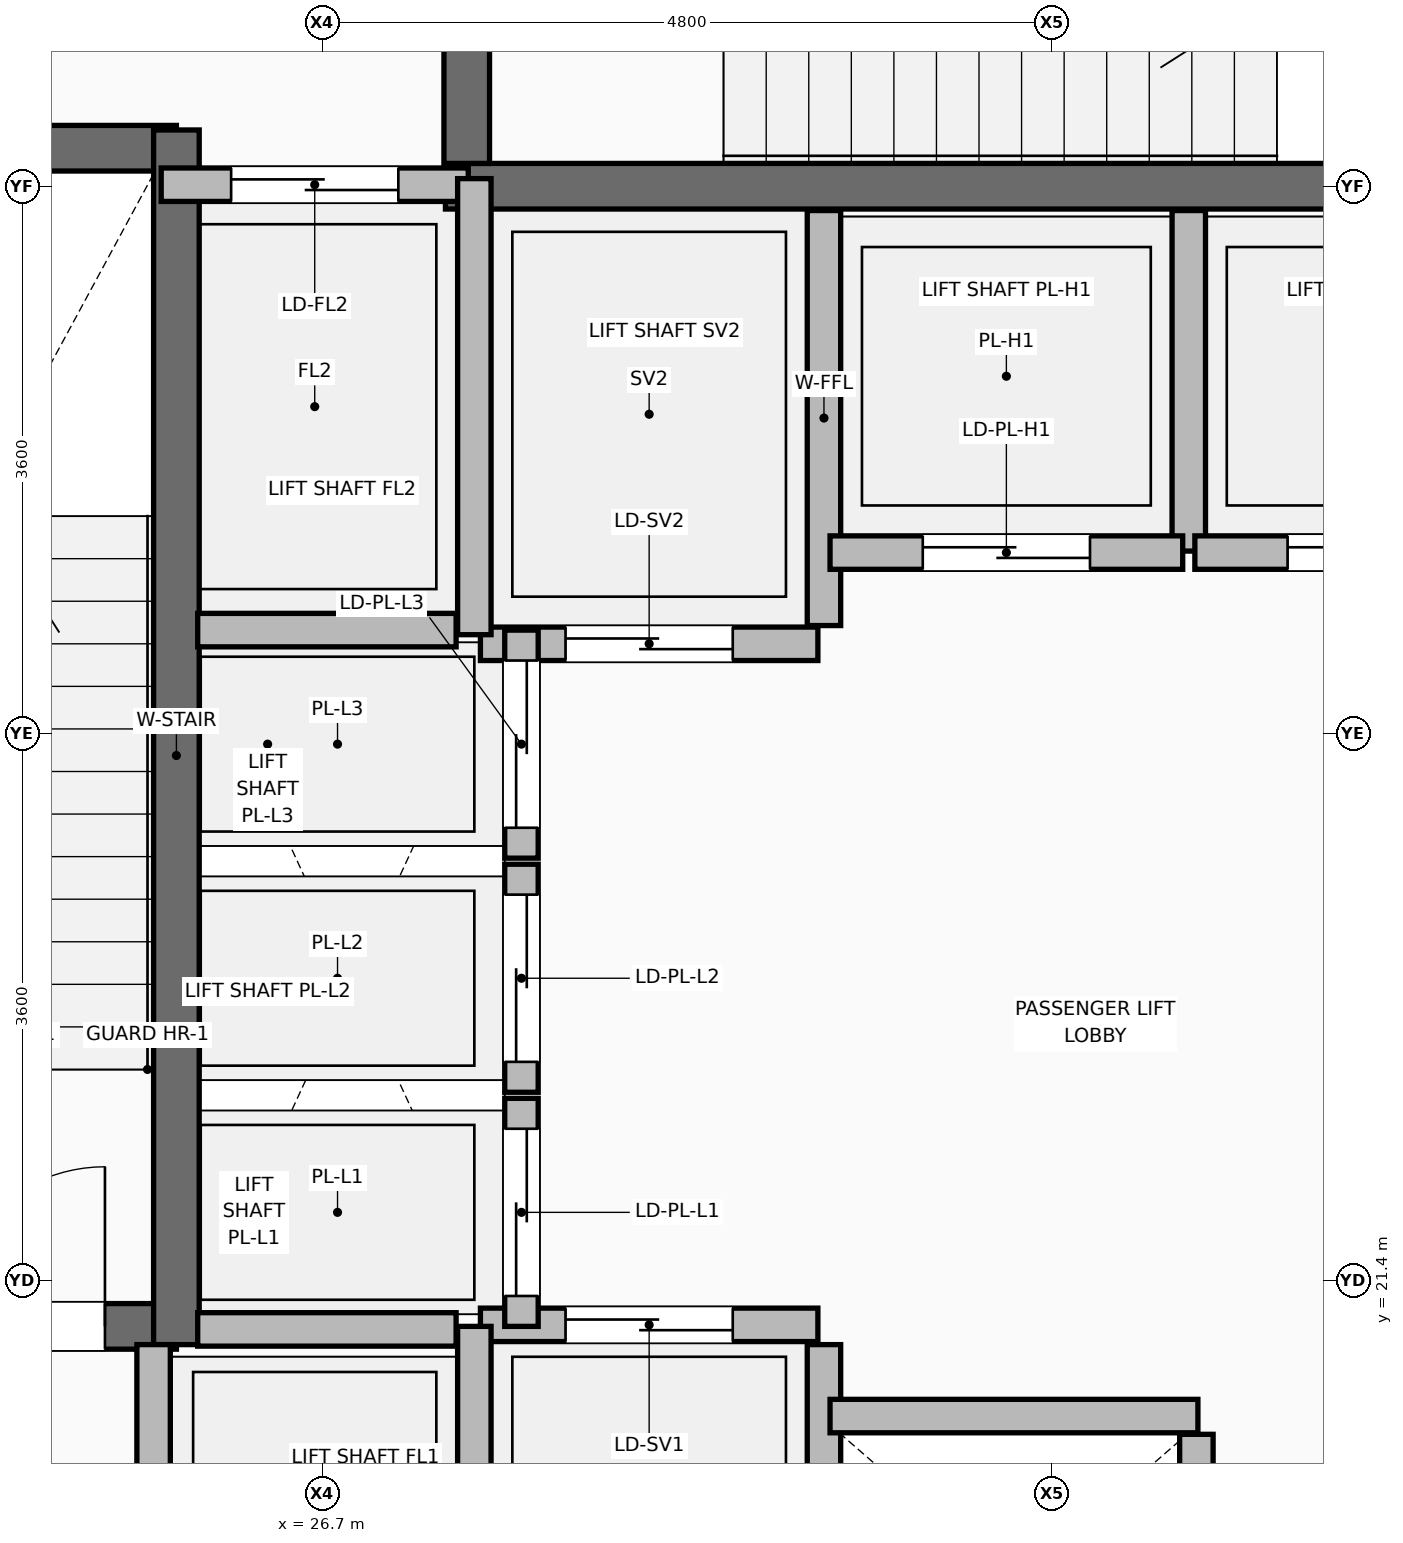
"""IFC4 building model, lengths in metres.
Left out: names, types, materials, properties, quantities, classifications, styles, units other than length and angle.
Written with IfcOpenShell. Run it as: python <this file> out.ifc"""

import sys

from ifc_helpers import new_model, si_unit, direction, frame, frame_2d, origin, place, context, subcontext, project, spatial, rectangle, extrude, element, fill, save


model = new_model("IFC4")
c1 = context("Model", 3, precision=1e-05, world=origin(), true_north=direction((0.0, 1.0)))
c2 = subcontext(c1, "Body", "Model", "MODEL_VIEW")
j1 = project(units=[si_unit("LENGTHUNIT", "METRE"), si_unit("PLANEANGLEUNIT", "RADIAN")], contexts=[c1])
p1 = place(None, origin())
s1 = spatial("IfcSite", under=j1, at=p1, CompositionType="ELEMENT")
p2 = place(p1, origin())
s2 = spatial("IfcBuilding", under=s1, at=p2, CompositionType="ELEMENT")
p3 = place(p2, frame((0.0, 0.0, 96.15)))
s3 = spatial("IfcBuildingStorey", under=s2, at=p3, CompositionType="ELEMENT", Elevation=96.15)
p4 = place(p3, frame((30.0, 18.08, 0.0), z_axis=(0.0, 0.0, 1.0), x_axis=(0.0, 1.0, 0.0)))
e1 = element("IfcWall", 1, at=p4, inside=s3, PredefinedType="PARTITIONING", context=c2, shape_type="SweptSolid", body=[
    extrude(rectangle(XDim=2.9, YDim=0.22, at=frame_2d((1.45, 0.0))), origin(), (0.0, 0.0, 1.0), 4.595),
])
p5 = place(p3, frame((32.45, 17.92, 0.0), z_axis=(0.0, 0.0, 1.0), x_axis=(0.0, 1.0, 0.0)))
e2 = element("IfcWall", 2, at=p5, inside=s3, PredefinedType="PARTITIONING", context=c2, shape_type="SweptSolid", body=[
    extrude(rectangle(XDim=2.47, YDim=0.22, at=frame_2d((1.235, 0.0))), origin(), (0.0, 0.0, 1.0), 4.056),
])
p6 = place(p3, frame((30.0, 25.71, 0.0), z_axis=(0.0, 0.0, 1.0), x_axis=(0.0, 1.0, 0.0)))
e3 = element("IfcWall", 3, at=p6, inside=s3, PredefinedType="PARTITIONING", context=c2, shape_type="SweptSolid", body=[
    extrude(rectangle(XDim=2.73, YDim=0.22, at=frame_2d((1.365, 0.0))), origin(), (0.0, 0.0, 1.0), 4.595),
])
p7 = place(p3, frame((32.4, 26.2, 0.0), z_axis=(0.0, 0.0, 1.0), x_axis=(0.0, 1.0, 0.0)))
e4 = element("IfcWall", 4, at=p7, inside=s3, PredefinedType="PARTITIONING", context=c2, shape_type="SweptSolid", body=[
    extrude(rectangle(XDim=2.24, YDim=0.22, at=frame_2d((1.12, 0.0))), origin(), (0.0, 0.0, 1.0), 4.595),
])
p8 = place(p3, frame((22.175, 21.1, 0.0), z_axis=(0.0, 0.0, 1.0), x_axis=(1.0, 0.0, 0.0)))
e5 = element("IfcWall", 5, at=p8, inside=s3, PredefinedType="SHEAR", context=c2, shape_type="SweptSolid", body=[
    extrude(rectangle(XDim=3.565, YDim=0.3, at=frame_2d((1.782, 0.0))), origin(), (0.0, 0.0, 1.0), 4.62),
])
p9 = place(p8, frame((2.045, 0.0, 0.0)))
e6 = element("IfcOpeningElement", 6, at=p9, cuts=e5, PredefinedType="OPENING", context=c2, shape_type="SweptSolid", body=[
    extrude(rectangle(XDim=1.05, YDim=2.1, at=frame_2d((0.525, 1.05))), frame((0.0, 0.16, 0.0), z_axis=(0.0, -1.0, 0.0), x_axis=(1.0, 0.0, 0.0)), (0.0, 0.0, 1.0), 0.32),
])
p10 = place(p3, frame((22.175, 28.85, 0.0), z_axis=(0.0, 0.0, 1.0), x_axis=(1.0, 0.0, 0.0)))
e7 = element("IfcWall", 7, at=p10, inside=s3, PredefinedType="SHEAR", context=c2, shape_type="SweptSolid", body=[
    extrude(rectangle(XDim=3.565, YDim=0.3, at=frame_2d((1.782, 0.0))), origin(), (0.0, 0.0, 1.0), 4.62),
])
p11 = place(p3, frame((25.74, 20.98, 0.0), z_axis=(0.0, 0.0, 1.0), x_axis=(0.0, 1.0, 0.0)))
e8 = element("IfcWall", 8, at=p11, inside=s3, PredefinedType="SHEAR", context=c2, shape_type="SweptSolid", body=[
    extrude(rectangle(XDim=7.99, YDim=0.3, at=frame_2d((3.995, 0.0))), origin(), (0.0, 0.0, 1.0), 4.62),
])
p12 = place(p3, frame((27.51, 28.6, 0.0), z_axis=(0.0, 0.0, 1.0), x_axis=(1.0, 0.0, 0.0)))
e9 = element("IfcWall", 9, at=p12, inside=s3, PredefinedType="SHEAR", context=c2, shape_type="SweptSolid", body=[
    extrude(rectangle(XDim=8.03, YDim=0.3, at=frame_2d((4.015, 0.0))), origin(), (0.0, 0.0, 1.0), 4.62),
])
p13 = place(p3, frame((27.65, 28.75, 0.0), z_axis=(0.0, 0.0, 1.0), x_axis=(0.0, 1.0, 0.0)))
e10 = element("IfcWall", 10, at=p13, inside=s3, PredefinedType="SHEAR", context=c2, shape_type="SweptSolid", body=[
    extrude(rectangle(XDim=3.425, YDim=0.3, at=frame_2d((1.712, 0.0))), origin(), (0.0, 0.0, 1.0), 4.62),
])
p14 = place(p13, frame((1.0, 0.0, 0.0)))
e11 = element("IfcOpeningElement", 11, at=p14, cuts=e10, PredefinedType="OPENING", context=c2, shape_type="SweptSolid", body=[
    extrude(rectangle(XDim=1.05, YDim=2.1, at=frame_2d((0.525, 1.05))), frame((0.0, 0.16, 0.0), z_axis=(0.0, -1.0, 0.0), x_axis=(1.0, 0.0, 0.0)), (0.0, 0.0, 1.0), 0.32),
])
p15 = place(p3, frame((25.59, 18.22, 0.0), z_axis=(0.0, 0.0, 1.0), x_axis=(0.0, 1.0, 0.0)))
e12 = element("IfcWall", 12, at=p15, inside=s3, PredefinedType="PARTITIONING", context=c2, shape_type="SweptSolid", body=[
    extrude(rectangle(XDim=2.76, YDim=0.22, at=frame_2d((1.38, 0.0))), origin(), (0.0, 0.0, 1.0), 4.6),
])
p16 = place(p15, frame((0.83, 0.0, 0.0)))
e13 = element("IfcOpeningElement", 13, at=p16, cuts=e12, PredefinedType="OPENING", context=c2, shape_type="SweptSolid", body=[
    extrude(rectangle(XDim=1.1, YDim=2.2, at=frame_2d((0.55, 1.1))), frame((0.0, 0.12, 0.0), z_axis=(0.0, -1.0, 0.0), x_axis=(1.0, 0.0, 0.0)), (0.0, 0.0, 1.0), 0.24),
])
p17 = place(p3, frame((25.64, 28.61, 0.0), z_axis=(0.0, 0.0, 1.0), x_axis=(1.0, 0.0, 0.0)))
e14 = element("IfcWall", 14, at=p17, inside=s3, PredefinedType="PARTITIONING", context=c2, shape_type="SweptSolid", body=[
    extrude(rectangle(XDim=2.02, YDim=0.22, at=frame_2d((1.01, 0.0))), origin(), (0.0, 0.0, 1.0), 4.6),
])
p18 = place(p17, frame((0.46, 0.0, 0.0)))
e15 = element("IfcOpeningElement", 15, at=p18, cuts=e14, PredefinedType="OPENING", context=c2, shape_type="SweptSolid", body=[
    extrude(rectangle(XDim=1.1, YDim=2.2, at=frame_2d((0.55, 1.1))), frame((0.0, 0.12, 0.0), z_axis=(0.0, -1.0, 0.0), x_axis=(1.0, 0.0, 0.0)), (0.0, 0.0, 1.0), 0.24),
])
p19 = place(p3, frame((27.74, 21.11, 0.0), z_axis=(0.0, 0.0, 1.0), x_axis=(1.0, 0.0, 0.0)))
e16 = element("IfcWall", 16, at=p19, inside=s3, PredefinedType="PARTITIONING", context=c2, shape_type="SweptSolid", body=[
    extrude(rectangle(XDim=2.22, YDim=0.22, at=frame_2d((1.11, 0.0))), origin(), (0.0, 0.0, 1.0), 4.6),
])
p20 = place(p19, frame((0.56, 0.0, 0.0)))
e17 = element("IfcOpeningElement", 17, at=p20, cuts=e16, PredefinedType="OPENING", context=c2, shape_type="SweptSolid", body=[
    extrude(rectangle(XDim=1.1, YDim=2.2, at=frame_2d((0.55, 1.1))), frame((0.0, 0.12, 0.0), z_axis=(0.0, -1.0, 0.0), x_axis=(1.0, 0.0, 0.0)), (0.0, 0.0, 1.0), 0.24),
])
p21 = place(p3, frame((27.74, 25.59, 0.0), z_axis=(0.0, 0.0, 1.0), x_axis=(1.0, 0.0, 0.0)))
e18 = element("IfcWall", 18, at=p21, inside=s3, PredefinedType="PARTITIONING", context=c2, shape_type="SweptSolid", body=[
    extrude(rectangle(XDim=2.22, YDim=0.22, at=frame_2d((1.11, 0.0))), origin(), (0.0, 0.0, 1.0), 4.6),
])
p22 = place(p21, frame((0.56, 0.0, 0.0)))
e19 = element("IfcOpeningElement", 19, at=p22, cuts=e18, PredefinedType="OPENING", context=c2, shape_type="SweptSolid", body=[
    extrude(rectangle(XDim=1.1, YDim=2.2, at=frame_2d((0.55, 1.1))), frame((0.0, 0.12, 0.0), z_axis=(0.0, -1.0, 0.0), x_axis=(1.0, 0.0, 0.0)), (0.0, 0.0, 1.0), 0.24),
])
p23 = place(p3, frame((30.04, 20.51, 0.0), z_axis=(0.0, 0.0, 1.0), x_axis=(1.0, 0.0, 0.0)))
e20 = element("IfcWall", 20, at=p23, inside=s3, PredefinedType="PARTITIONING", context=c2, shape_type="SweptSolid", body=[
    extrude(rectangle(XDim=2.42, YDim=0.22, at=frame_2d((1.21, 0.0))), origin(), (0.0, 0.0, 1.0), 4.6),
])
p24 = place(p3, frame((30.04, 26.19, 0.0), z_axis=(0.0, 0.0, 1.0), x_axis=(1.0, 0.0, 0.0)))
e21 = element("IfcWall", 21, at=p24, inside=s3, PredefinedType="PARTITIONING", context=c2, shape_type="SweptSolid", body=[
    extrude(rectangle(XDim=2.32, YDim=0.22, at=frame_2d((1.16, 0.0))), origin(), (0.0, 0.0, 1.0), 4.6),
])
p25 = place(p24, frame((0.61, 0.0, 0.0)))
e22 = element("IfcOpeningElement", 22, at=p25, cuts=e21, PredefinedType="OPENING", context=c2, shape_type="SweptSolid", body=[
    extrude(rectangle(XDim=1.1, YDim=2.2, at=frame_2d((0.55, 1.1))), frame((0.0, 0.12, 0.0), z_axis=(0.0, -1.0, 0.0), x_axis=(1.0, 0.0, 0.0)), (0.0, 0.0, 1.0), 0.24),
])
p26 = place(p3, frame((32.44, 26.19, 0.0), z_axis=(0.0, 0.0, 1.0), x_axis=(1.0, 0.0, 0.0)))
e23 = element("IfcWall", 23, at=p26, inside=s3, PredefinedType="PARTITIONING", context=c2, shape_type="SweptSolid", body=[
    extrude(rectangle(XDim=2.32, YDim=0.22, at=frame_2d((1.16, 0.0))), origin(), (0.0, 0.0, 1.0), 4.6),
])
p27 = place(p26, frame((0.61, 0.0, 0.0)))
e24 = element("IfcOpeningElement", 24, at=p27, cuts=e23, PredefinedType="OPENING", context=c2, shape_type="SweptSolid", body=[
    extrude(rectangle(XDim=1.1, YDim=2.2, at=frame_2d((0.55, 1.1))), frame((0.0, 0.12, 0.0), z_axis=(0.0, -1.0, 0.0), x_axis=(1.0, 0.0, 0.0)), (0.0, 0.0, 1.0), 0.24),
])
p28 = place(p3, frame((28.01, 21.1, 0.0), z_axis=(0.0, 0.0, 1.0), x_axis=(0.0, 1.0, 0.0)))
e25 = element("IfcWall", 25, at=p28, inside=s3, PredefinedType="PARTITIONING", context=c2, shape_type="SweptSolid", body=[
    extrude(rectangle(XDim=1.5, YDim=0.22, at=frame_2d((0.75, 0.0))), origin(), (0.0, 0.0, 1.0), 4.6),
])
p29 = place(p28, frame((0.2, 0.0, 0.0)))
e26 = element("IfcOpeningElement", 26, at=p29, cuts=e25, PredefinedType="OPENING", context=c2, shape_type="SweptSolid", body=[
    extrude(rectangle(XDim=1.1, YDim=2.2, at=frame_2d((0.55, 1.1))), frame((0.0, 0.12, 0.0), z_axis=(0.0, -1.0, 0.0), x_axis=(1.0, 0.0, 0.0)), (0.0, 0.0, 1.0), 0.24),
])
p30 = place(p3, frame((28.01, 22.64, 0.0), z_axis=(0.0, 0.0, 1.0), x_axis=(0.0, 1.0, 0.0)))
e27 = element("IfcWall", 27, at=p30, inside=s3, PredefinedType="PARTITIONING", context=c2, shape_type="SweptSolid", body=[
    extrude(rectangle(XDim=1.5, YDim=0.22, at=frame_2d((0.75, 0.0))), origin(), (0.0, 0.0, 1.0), 4.6),
])
p31 = place(p30, frame((0.2, 0.0, 0.0)))
e28 = element("IfcOpeningElement", 28, at=p31, cuts=e27, PredefinedType="OPENING", context=c2, shape_type="SweptSolid", body=[
    extrude(rectangle(XDim=1.1, YDim=2.2, at=frame_2d((0.55, 1.1))), frame((0.0, 0.12, 0.0), z_axis=(0.0, -1.0, 0.0), x_axis=(1.0, 0.0, 0.0)), (0.0, 0.0, 1.0), 0.24),
])
p32 = place(p3, frame((28.01, 24.18, 0.0), z_axis=(0.0, 0.0, 1.0), x_axis=(0.0, 1.0, 0.0)))
e29 = element("IfcWall", 29, at=p32, inside=s3, PredefinedType="PARTITIONING", context=c2, shape_type="SweptSolid", body=[
    extrude(rectangle(XDim=1.5, YDim=0.22, at=frame_2d((0.75, 0.0))), origin(), (0.0, 0.0, 1.0), 4.6),
])
p33 = place(p32, frame((0.2, 0.0, 0.0)))
e30 = element("IfcOpeningElement", 30, at=p33, cuts=e29, PredefinedType="OPENING", context=c2, shape_type="SweptSolid", body=[
    extrude(rectangle(XDim=1.1, YDim=2.2, at=frame_2d((0.55, 1.1))), frame((0.0, 0.12, 0.0), z_axis=(0.0, -1.0, 0.0), x_axis=(1.0, 0.0, 0.0)), (0.0, 0.0, 1.0), 0.24),
])
p34 = place(p3, frame((27.7, 18.15, 0.0), z_axis=(0.0, 0.0, 1.0), x_axis=(0.0, 1.0, 0.0)))
e31 = element("IfcWall", 31, at=p34, inside=s3, PredefinedType="PARTITIONING", context=c2, shape_type="SweptSolid", body=[
    extrude(rectangle(XDim=2.95, YDim=0.22, at=frame_2d((1.475, 0.0))), origin(), (0.0, 0.0, 1.0), 4.6),
])
p35 = place(p3, frame((27.7, 25.65, 0.0), z_axis=(0.0, 0.0, 1.0), x_axis=(0.0, 1.0, 0.0)))
e32 = element("IfcWall", 32, at=p35, inside=s3, PredefinedType="PARTITIONING", context=c2, shape_type="SweptSolid", body=[
    extrude(rectangle(XDim=3.0, YDim=0.22, at=frame_2d((1.5, 0.0))), origin(), (0.0, 0.0, 1.0), 4.6),
])
for number, where, z_axis, x_axis in (
    (33, (25.88, 21.08, 0.0), (0.0, 0.0, 1.0), (1.0, 0.0, 0.0)),
    (34, (25.88, 25.68, 0.0), (0.0, 0.0, 1.0), (1.0, 0.0, 0.0)),
):
    element("IfcWall", number, at=place(p3, frame(where, z_axis=z_axis, x_axis=x_axis)), inside=s3, PredefinedType="PARTITIONING", context=c2, shape_type="SweptSolid", body=[
        extrude(rectangle(XDim=1.7, YDim=0.22, at=frame_2d((0.85, 0.0))), origin(), (0.0, 0.0, 1.0), 4.6),
    ])
p36 = place(p9, origin())
e35 = element("IfcDoor", 35, at=p36, inside=s3, OperationType="SINGLE_SWING_RIGHT", PredefinedType="DOOR", context=c2, shape_type="SweptSolid", body=[
    extrude(rectangle(XDim=1.05, YDim=2.1, at=frame_2d((0.525, 1.05))), frame((0.0, 0.025, 0.0), z_axis=(0.0, -1.0, 0.0), x_axis=(1.0, 0.0, 0.0)), (0.0, 0.0, 1.0), 0.05),
])
fill(e6, e35)
p37 = place(p18, origin())
e36 = element("IfcDoor", 36, at=p37, inside=s3, OperationType="DOUBLE_DOOR_SLIDING", PredefinedType="DOOR", context=c2, shape_type="SweptSolid", body=[
    extrude(rectangle(XDim=1.1, YDim=2.2, at=frame_2d((0.55, 1.1))), frame((0.0, 0.025, 0.0), z_axis=(0.0, -1.0, 0.0), x_axis=(1.0, 0.0, 0.0)), (0.0, 0.0, 1.0), 0.05),
])
fill(e15, e36)
p38 = place(p20, origin())
e37 = element("IfcDoor", 37, at=p38, inside=s3, OperationType="DOUBLE_DOOR_SLIDING", PredefinedType="DOOR", context=c2, shape_type="SweptSolid", body=[
    extrude(rectangle(XDim=1.1, YDim=2.2, at=frame_2d((0.55, 1.1))), frame((0.0, 0.025, 0.0), z_axis=(0.0, -1.0, 0.0), x_axis=(1.0, 0.0, 0.0)), (0.0, 0.0, 1.0), 0.05),
])
fill(e17, e37)
p39 = place(p22, frame((1.1, 0.0, 0.0), z_axis=(0.0, 0.0, 1.0), x_axis=(-1.0, 0.0, 0.0)))
e38 = element("IfcDoor", 38, at=p39, inside=s3, OperationType="DOUBLE_DOOR_SLIDING", PredefinedType="DOOR", context=c2, shape_type="SweptSolid", body=[
    extrude(rectangle(XDim=1.1, YDim=2.2, at=frame_2d((0.55, 1.1))), frame((0.0, 0.025, 0.0), z_axis=(0.0, -1.0, 0.0), x_axis=(1.0, 0.0, 0.0)), (0.0, 0.0, 1.0), 0.05),
])
fill(e19, e38)
p40 = place(p25, frame((1.1, 0.0, 0.0), z_axis=(0.0, 0.0, 1.0), x_axis=(-1.0, 0.0, 0.0)))
e39 = element("IfcDoor", 39, at=p40, inside=s3, OperationType="DOUBLE_DOOR_SLIDING", PredefinedType="DOOR", context=c2, shape_type="SweptSolid", body=[
    extrude(rectangle(XDim=1.1, YDim=2.2, at=frame_2d((0.55, 1.1))), frame((0.0, 0.025, 0.0), z_axis=(0.0, -1.0, 0.0), x_axis=(1.0, 0.0, 0.0)), (0.0, 0.0, 1.0), 0.05),
])
fill(e22, e39)
p41 = place(p27, frame((1.1, 0.0, 0.0), z_axis=(0.0, 0.0, 1.0), x_axis=(-1.0, 0.0, 0.0)))
e40 = element("IfcDoor", 40, at=p41, inside=s3, OperationType="DOUBLE_DOOR_SLIDING", PredefinedType="DOOR", context=c2, shape_type="SweptSolid", body=[
    extrude(rectangle(XDim=1.1, YDim=2.2, at=frame_2d((0.55, 1.1))), frame((0.0, 0.025, 0.0), z_axis=(0.0, -1.0, 0.0), x_axis=(1.0, 0.0, 0.0)), (0.0, 0.0, 1.0), 0.05),
])
fill(e24, e40)
p42 = place(p29, frame((1.1, 0.0, 0.0), z_axis=(0.0, 0.0, 1.0), x_axis=(-1.0, 0.0, 0.0)))
e41 = element("IfcDoor", 41, at=p42, inside=s3, OperationType="DOUBLE_DOOR_SLIDING", PredefinedType="DOOR", context=c2, shape_type="SweptSolid", body=[
    extrude(rectangle(XDim=1.1, YDim=2.2, at=frame_2d((0.55, 1.1))), frame((0.0, 0.025, 0.0), z_axis=(0.0, -1.0, 0.0), x_axis=(1.0, 0.0, 0.0)), (0.0, 0.0, 1.0), 0.05),
])
fill(e26, e41)
p43 = place(p31, frame((1.1, 0.0, 0.0), z_axis=(0.0, 0.0, 1.0), x_axis=(-1.0, 0.0, 0.0)))
e42 = element("IfcDoor", 42, at=p43, inside=s3, OperationType="DOUBLE_DOOR_SLIDING", PredefinedType="DOOR", context=c2, shape_type="SweptSolid", body=[
    extrude(rectangle(XDim=1.1, YDim=2.2, at=frame_2d((0.55, 1.1))), frame((0.0, 0.025, 0.0), z_axis=(0.0, -1.0, 0.0), x_axis=(1.0, 0.0, 0.0)), (0.0, 0.0, 1.0), 0.05),
])
fill(e28, e42)
p44 = place(p33, frame((1.1, 0.0, 0.0), z_axis=(0.0, 0.0, 1.0), x_axis=(-1.0, 0.0, 0.0)))
e43 = element("IfcDoor", 43, at=p44, inside=s3, OperationType="DOUBLE_DOOR_SLIDING", PredefinedType="DOOR", context=c2, shape_type="SweptSolid", body=[
    extrude(rectangle(XDim=1.1, YDim=2.2, at=frame_2d((0.55, 1.1))), frame((0.0, 0.025, 0.0), z_axis=(0.0, -1.0, 0.0), x_axis=(1.0, 0.0, 0.0)), (0.0, 0.0, 1.0), 0.05),
])
fill(e30, e43)
save(model, sys.argv[1])
